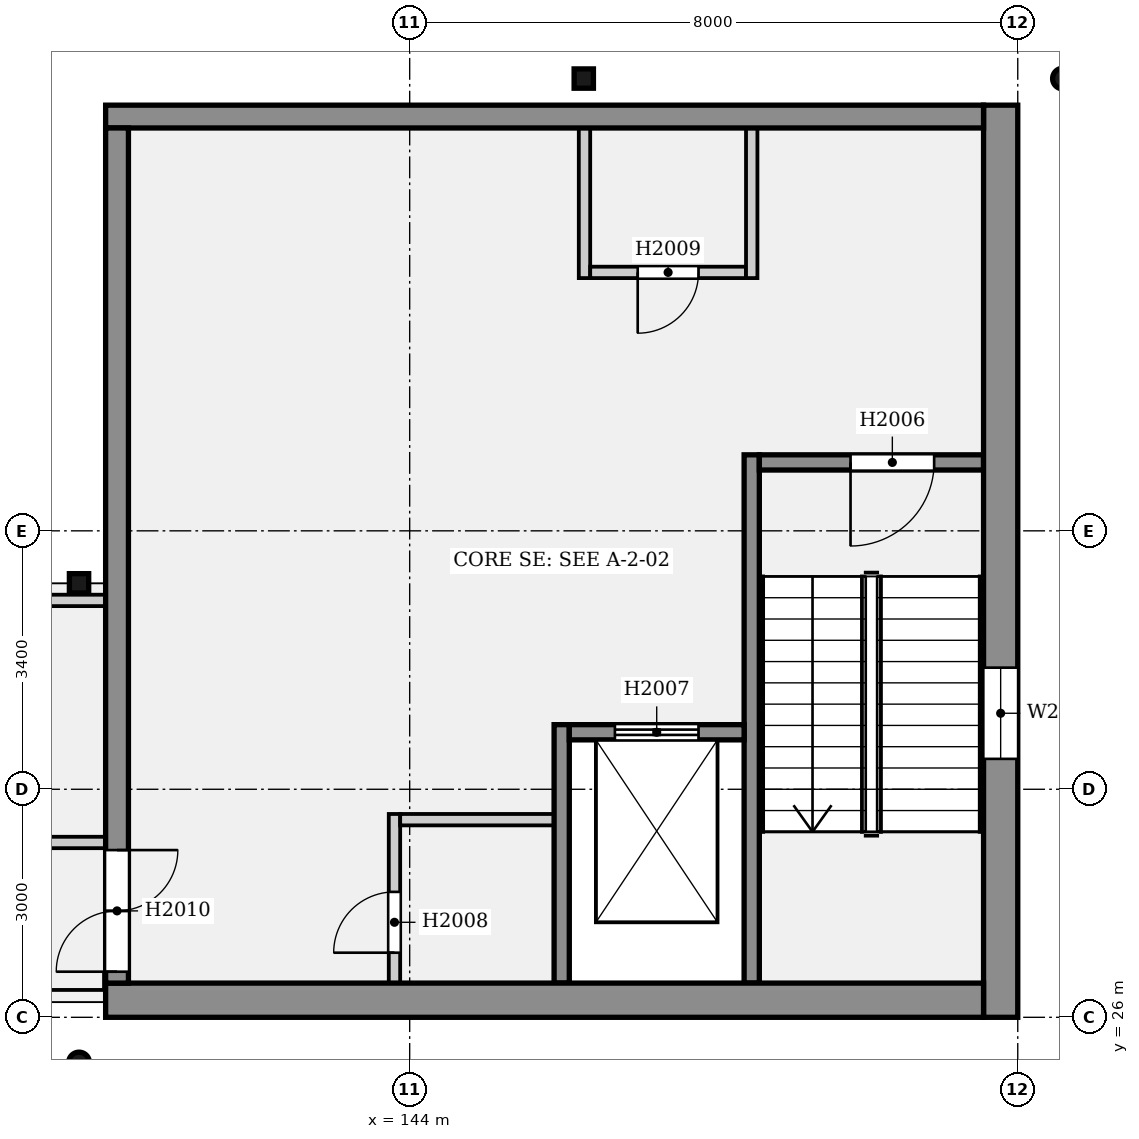
"""IFC4 building model, lengths in metres.
Left out: names, types, materials, properties, quantities, classifications, styles, units other than length and angle.
Written with IfcOpenShell. Run it as: python <this file> out.ifc"""

import sys

from ifc_helpers import new_model, si_unit, direction, frame, frame_2d, origin, origin_2d, place, context, subcontext, project, spatial, rectangle, hollow_rectangle, hollow_circle, extrude, element, fill, save


model = new_model("IFC4")
c1 = context("Model", 3, precision=1e-05, world=origin(), true_north=direction((0.0, 1.0)))
c2 = subcontext(c1, "Body", "Model", "MODEL_VIEW")
j1 = project(units=[si_unit("LENGTHUNIT", "METRE"), si_unit("PLANEANGLEUNIT", "RADIAN")], contexts=[c1])
p1 = place(None, origin())
s1 = spatial("IfcSite", under=j1, at=p1, CompositionType="ELEMENT")
p2 = place(p1, origin())
s2 = spatial("IfcBuilding", under=s1, at=p2, CompositionType="ELEMENT")
p3 = place(p2, frame((0.0, 0.0, 9.4)))
s3 = spatial("IfcBuildingStorey", under=s2, at=p3, CompositionType="ELEMENT", Elevation=9.4)
p4 = place(p3, frame((151.775, 26.0, 0.0), z_axis=(0.0, 0.0, 1.0), x_axis=(0.0, 1.0, 0.0)))
e1 = element("IfcWall", 1, at=p4, inside=s3, PredefinedType="ELEMENTEDWALL", context=c2, shape_type="SweptSolid", body=[
    extrude(rectangle(XDim=12.0, YDim=0.45, at=frame_2d((6.0, 0.0))), origin(), (0.0, 0.0, 1.0), 4.4),
])
p5 = place(p4, frame((3.4, 0.0, 0.6)))
e2 = element("IfcOpeningElement", 2, at=p5, cuts=e1, PredefinedType="OPENING", context=c2, shape_type="SweptSolid", body=[
    extrude(rectangle(XDim=1.2, YDim=3.0, at=frame_2d((0.6, 1.5))), frame((0.0, 0.235, 0.0), z_axis=(0.0, -1.0, 0.0), x_axis=(1.0, 0.0, 0.0)), (0.0, 0.0, 1.0), 0.47),
])
p6 = place(p3, frame((151.55, 26.225, 0.0), z_axis=(0.0, 0.0, 1.0), x_axis=(-1.0, 0.0, 0.0)))
e3 = element("IfcWall", 3, at=p6, inside=s3, PredefinedType="ELEMENTEDWALL", context=c2, shape_type="SweptSolid", body=[
    extrude(rectangle(XDim=11.55, YDim=0.45, at=frame_2d((5.775, 0.0))), origin(), (0.0, 0.0, 1.0), 4.4),
])
p7 = place(p3, frame((140.15, 26.45, 0.0), z_axis=(0.0, 0.0, 1.0), x_axis=(0.0, 1.0, 0.0)))
e4 = element("IfcWall", 4, at=p7, inside=s3, PredefinedType="SOLIDWALL", context=c2, shape_type="SweptSolid", body=[
    extrude(rectangle(XDim=11.25, YDim=0.3, at=frame_2d((5.625, 0.0))), origin(), (0.0, 0.0, 1.0), 4.4),
])
p8 = place(p7, frame((0.15, 0.0, 0.0)))
e5 = element("IfcOpeningElement", 5, at=p8, cuts=e4, PredefinedType="OPENING", context=c2, shape_type="SweptSolid", body=[
    extrude(rectangle(XDim=1.6, YDim=2.1, at=frame_2d((0.8, 1.05))), frame((0.0, 0.16, 0.0), z_axis=(0.0, -1.0, 0.0), x_axis=(1.0, 0.0, 0.0)), (0.0, 0.0, 1.0), 0.32),
])
p9 = place(p3, frame((151.55, 37.85, 0.0), z_axis=(0.0, 0.0, 1.0), x_axis=(-1.0, 0.0, 0.0)))
e6 = element("IfcWall", 6, at=p9, inside=s3, PredefinedType="SOLIDWALL", context=c2, shape_type="SweptSolid", body=[
    extrude(rectangle(XDim=11.55, YDim=0.3, at=frame_2d((5.775, 0.0))), origin(), (0.0, 0.0, 1.0), 4.4),
])
p10 = place(p3, frame((139.65, 25.405, 0.0), z_axis=(0.0, -0.19937762145, 0.979922733722), x_axis=(1.0, 0.0, 0.0)))
e7 = element("IfcColumn", 7, at=p10, inside=s3, PredefinedType="COLUMN", context=c2, shape_type="SweptSolid", body=[
    extrude(hollow_circle(Radius=0.136, WallThickness=0.013, at=origin_2d()), origin(), (0.0, 0.0, 1.0), 3.54),
])
p11 = place(p3, frame((139.65, 31.71, 0.0), z_axis=(0.0, 0.0, 1.0), x_axis=(1.0, 0.0, 0.0)))
e8 = element("IfcColumn", 8, at=p11, inside=s3, PredefinedType="COLUMN", context=c2, shape_type="SweptSolid", body=[
    extrude(hollow_rectangle(XDim=0.254, YDim=0.254, WallThickness=0.016, InnerFilletRadius=0.008, OuterFilletRadius=0.024, at=origin_2d()), origin(), (0.0, 0.0, 1.0), 3.496),
])
p12 = place(p3, frame((152.595, 38.35, 0.0), z_axis=(0.19937762145, 0.0, 0.979922733722), x_axis=(0.0, 1.0, 0.0)))
e9 = element("IfcColumn", 9, at=p12, inside=s3, PredefinedType="COLUMN", context=c2, shape_type="SweptSolid", body=[
    extrude(hollow_circle(Radius=0.136, WallThickness=0.013, at=origin_2d()), origin(), (0.0, 0.0, 1.0), 3.54),
])
p13 = place(p3, frame((146.29, 38.35, 0.0), z_axis=(0.0, 0.0, 1.0), x_axis=(1.0, 0.0, 0.0)))
e10 = element("IfcColumn", 10, at=p13, inside=s3, PredefinedType="COLUMN", context=c2, shape_type="SweptSolid", body=[
    extrude(hollow_rectangle(XDim=0.254, YDim=0.254, WallThickness=0.016, InnerFilletRadius=0.008, OuterFilletRadius=0.024, at=origin_2d()), origin(), (0.0, 0.0, 1.0), 3.496),
])
p14 = place(p3, frame((148.5, 26.45, 0.0), z_axis=(0.0, 0.0, 1.0), x_axis=(0.0, 1.0, 0.0)))
e11 = element("IfcWall", 11, at=p14, inside=s3, PredefinedType="SOLIDWALL", context=c2, shape_type="SweptSolid", body=[
    extrude(rectangle(XDim=6.95, YDim=0.2, at=frame_2d((3.475, 0.0))), origin(), (0.0, 0.0, 1.0), 4.4),
])
p15 = place(p3, frame((151.55, 33.3, 0.0), z_axis=(0.0, 0.0, 1.0), x_axis=(-1.0, 0.0, 0.0)))
e12 = element("IfcWall", 12, at=p15, inside=s3, PredefinedType="SOLIDWALL", context=c2, shape_type="SweptSolid", body=[
    extrude(rectangle(XDim=2.95, YDim=0.2, at=frame_2d((1.475, 0.0))), origin(), (0.0, 0.0, 1.0), 4.4),
])
p16 = place(p15, frame((0.65, 0.0, 0.0)))
e13 = element("IfcOpeningElement", 13, at=p16, cuts=e12, PredefinedType="OPENING", context=c2, shape_type="SweptSolid", body=[
    extrude(rectangle(XDim=1.1, YDim=2.1, at=frame_2d((0.55, 1.05))), frame((0.0, 0.11, 0.0), z_axis=(0.0, -1.0, 0.0), x_axis=(1.0, 0.0, 0.0)), (0.0, 0.0, 1.0), 0.22),
])
p17 = place(p3, frame((146.0, 26.45, 0.0), z_axis=(0.0, 0.0, 1.0), x_axis=(0.0, 1.0, 0.0)))
e14 = element("IfcWall", 14, at=p17, inside=s3, PredefinedType="SOLIDWALL", context=c2, shape_type="SweptSolid", body=[
    extrude(rectangle(XDim=3.4, YDim=0.2, at=frame_2d((1.7, 0.0))), origin(), (0.0, 0.0, 1.0), 4.4),
])
p18 = place(p3, frame((148.4, 29.75, 0.0), z_axis=(0.0, 0.0, 1.0), x_axis=(-1.0, 0.0, 0.0)))
e15 = element("IfcWall", 15, at=p18, inside=s3, PredefinedType="SOLIDWALL", context=c2, shape_type="SweptSolid", body=[
    extrude(rectangle(XDim=2.3, YDim=0.2, at=frame_2d((1.15, 0.0))), origin(), (0.0, 0.0, 1.0), 4.4),
])
p19 = place(p18, frame((0.6, 0.0, 0.0)))
e16 = element("IfcOpeningElement", 16, at=p19, cuts=e15, PredefinedType="OPENING", context=c2, shape_type="SweptSolid", body=[
    extrude(rectangle(XDim=1.1, YDim=2.1, at=frame_2d((0.55, 1.05))), frame((0.0, 0.11, 0.0), z_axis=(0.0, -1.0, 0.0), x_axis=(1.0, 0.0, 0.0)), (0.0, 0.0, 1.0), 0.22),
])
p20 = place(p3, frame((145.9, 28.6, 0.0), z_axis=(0.0, 0.0, 1.0), x_axis=(-1.0, 0.0, 0.0)))
e17 = element("IfcWall", 17, at=p20, inside=s3, PredefinedType="PARTITIONING", context=c2, shape_type="SweptSolid", body=[
    extrude(rectangle(XDim=2.025, YDim=0.15, at=frame_2d((1.012, 0.0))), origin(), (0.0, 0.0, 1.0), 4.15),
])
p21 = place(p3, frame((143.8, 26.45, 0.0), z_axis=(0.0, 0.0, 1.0), x_axis=(0.0, 1.0, 0.0)))
e18 = element("IfcWall", 18, at=p21, inside=s3, PredefinedType="PARTITIONING", context=c2, shape_type="SweptSolid", body=[
    extrude(rectangle(XDim=2.225, YDim=0.15, at=frame_2d((1.113, 0.0))), origin(), (0.0, 0.0, 1.0), 4.15),
])
p22 = place(p21, frame((0.4, 0.0, 0.0)))
e19 = element("IfcOpeningElement", 19, at=p22, cuts=e18, PredefinedType="OPENING", context=c2, shape_type="SweptSolid", body=[
    extrude(rectangle(XDim=0.8, YDim=2.1, at=frame_2d((0.4, 1.05))), frame((0.0, 0.085, 0.0), z_axis=(0.0, -1.0, 0.0), x_axis=(1.0, 0.0, 0.0)), (0.0, 0.0, 1.0), 0.17),
])
p23 = place(p3, frame((148.425, 35.8, 0.0), z_axis=(0.0, 0.0, 1.0), x_axis=(-1.0, 0.0, 0.0)))
e20 = element("IfcWall", 20, at=p23, inside=s3, PredefinedType="PARTITIONING", context=c2, shape_type="SweptSolid", body=[
    extrude(rectangle(XDim=2.05, YDim=0.15, at=frame_2d((1.025, 0.0))), origin(), (0.0, 0.0, 1.0), 4.15),
])
p24 = place(p23, frame((0.625, 0.0, 0.0)))
e21 = element("IfcOpeningElement", 21, at=p24, cuts=e20, PredefinedType="OPENING", context=c2, shape_type="SweptSolid", body=[
    extrude(rectangle(XDim=0.8, YDim=2.1, at=frame_2d((0.4, 1.05))), frame((0.0, 0.085, 0.0), z_axis=(0.0, -1.0, 0.0), x_axis=(1.0, 0.0, 0.0)), (0.0, 0.0, 1.0), 0.17),
])
for number, where, z_axis, x_axis in (
    (22, (148.5, 35.725, 0.0), (0.0, 0.0, 1.0), (0.0, 1.0, 0.0)),
    (23, (146.3, 35.725, 0.0), (0.0, 0.0, 1.0), (0.0, 1.0, 0.0)),
):
    element("IfcWall", number, at=place(p3, frame(where, z_axis=z_axis, x_axis=x_axis)), inside=s3, PredefinedType="PARTITIONING", context=c2, shape_type="SweptSolid", body=[
        extrude(rectangle(XDim=1.975, YDim=0.15, at=frame_2d((0.987, 0.0))), origin(), (0.0, 0.0, 1.0), 4.15),
    ])
p25 = place(p3, frame((136.075, 28.3, 0.0), z_axis=(0.0, 0.0, 1.0), x_axis=(1.0, 0.0, 0.0)))
e24 = element("IfcWall", 24, at=p25, inside=s3, PredefinedType="PARTITIONING", context=c2, shape_type="SweptSolid", body=[
    extrude(rectangle(XDim=3.925, YDim=0.15, at=frame_2d((1.962, 0.0))), origin(), (0.0, 0.0, 1.0), 3.496),
])
p26 = place(p25, frame((1.425, 0.0, 0.0)))
e25 = element("IfcOpeningElement", 25, at=p26, cuts=e24, PredefinedType="OPENING", context=c2, shape_type="SweptSolid", body=[
    extrude(rectangle(XDim=1.0, YDim=2.1, at=frame_2d((0.5, 1.05))), frame((0.0, 0.085, 0.0), z_axis=(0.0, -1.0, 0.0), x_axis=(1.0, 0.0, 0.0)), (0.0, 0.0, 1.0), 0.17),
])
p27 = place(p3, frame((136.0, 31.485, 0.0), z_axis=(0.0, 0.0, 1.0), x_axis=(1.0, 0.0, 0.0)))
e26 = element("IfcWall", 26, at=p27, inside=s3, PredefinedType="PARTITIONING", context=c2, shape_type="SweptSolid", body=[
    extrude(rectangle(XDim=4.0, YDim=0.15, at=frame_2d((2.0, 0.0))), origin(), (0.0, 0.0, 1.0), 3.496),
])
p28 = place(p16, origin())
e27 = element("IfcDoor", 27, at=p28, inside=s3, OperationType="SINGLE_SWING_RIGHT", PredefinedType="DOOR", context=c2, shape_type="SweptSolid", body=[
    extrude(rectangle(XDim=1.1, YDim=2.1, at=frame_2d((0.55, 1.05))), frame((0.0, 0.025, 0.0), z_axis=(0.0, -1.0, 0.0), x_axis=(1.0, 0.0, 0.0)), (0.0, 0.0, 1.0), 0.05),
])
fill(e13, e27)
p29 = place(p19, origin())
e28 = element("IfcDoor", 28, at=p29, inside=s3, OperationType="DOUBLE_DOOR_SLIDING", PredefinedType="DOOR", context=c2, shape_type="SweptSolid", body=[
    extrude(rectangle(XDim=1.1, YDim=2.1, at=frame_2d((0.55, 1.05))), frame((0.0, 0.025, 0.0), z_axis=(0.0, -1.0, 0.0), x_axis=(1.0, 0.0, 0.0)), (0.0, 0.0, 1.0), 0.05),
])
fill(e16, e28)
p30 = place(p22, origin())
e29 = element("IfcDoor", 29, at=p30, inside=s3, OperationType="SINGLE_SWING_LEFT", PredefinedType="DOOR", context=c2, shape_type="SweptSolid", body=[
    extrude(rectangle(XDim=0.8, YDim=2.1, at=frame_2d((0.4, 1.05))), frame((0.0, 0.025, 0.0), z_axis=(0.0, -1.0, 0.0), x_axis=(1.0, 0.0, 0.0)), (0.0, 0.0, 1.0), 0.05),
])
fill(e19, e29)
p31 = place(p24, origin())
e30 = element("IfcDoor", 30, at=p31, inside=s3, OperationType="SINGLE_SWING_RIGHT", PredefinedType="DOOR", context=c2, shape_type="SweptSolid", body=[
    extrude(rectangle(XDim=0.8, YDim=2.1, at=frame_2d((0.4, 1.05))), frame((0.0, 0.025, 0.0), z_axis=(0.0, -1.0, 0.0), x_axis=(1.0, 0.0, 0.0)), (0.0, 0.0, 1.0), 0.05),
])
fill(e21, e30)
p32 = place(p8, origin())
e31 = element("IfcDoor", 31, at=p32, inside=s3, OperationType="DOUBLE_DOOR_SINGLE_SWING", PredefinedType="DOOR", context=c2, shape_type="SweptSolid", body=[
    extrude(rectangle(XDim=1.6, YDim=2.1, at=frame_2d((0.8, 1.05))), frame((0.0, 0.025, 0.0), z_axis=(0.0, -1.0, 0.0), x_axis=(1.0, 0.0, 0.0)), (0.0, 0.0, 1.0), 0.05),
])
fill(e5, e31)
p33 = place(p5, origin())
e32 = element("IfcWindow", 32, at=p33, inside=s3, PartitioningType="SINGLE_PANEL", PredefinedType="WINDOW", context=c2, shape_type="SweptSolid", body=[
    extrude(rectangle(XDim=1.2, YDim=3.0, at=frame_2d((0.6, 1.5))), frame((0.0, 0.03, 0.0), z_axis=(0.0, -1.0, 0.0), x_axis=(1.0, 0.0, 0.0)), (0.0, 0.0, 1.0), 0.06),
])
fill(e2, e32)
save(model, sys.argv[1])
